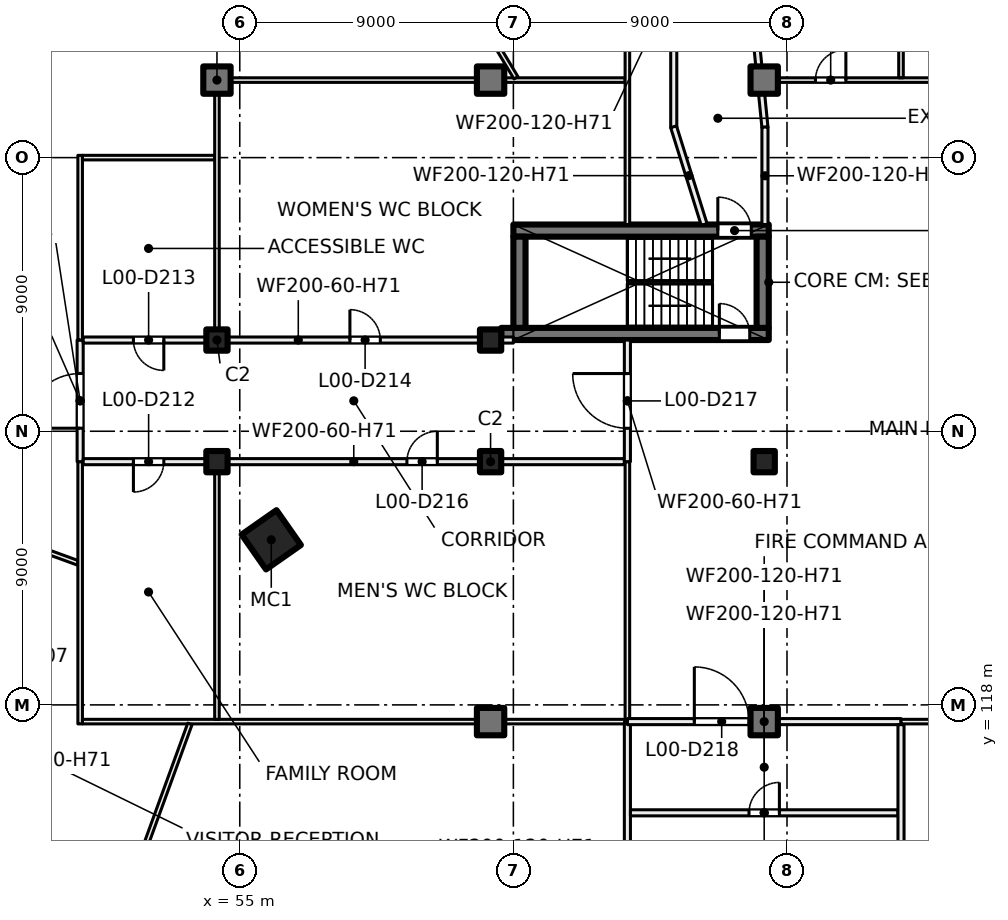
"""IFC4 building model, lengths in metres.
Left out: names, types, materials, properties, quantities, classifications, styles, units other than length and angle.
Written with IfcOpenShell. Run it as: python <this file> out.ifc"""

import sys

from ifc_helpers import new_model, si_unit, direction, frame, frame_2d, origin, origin_2d, place, context, subcontext, project, spatial, rectangle, hollow_rectangle, extrude, element, fill, save


model = new_model("IFC4")
c1 = context("Model", 3, precision=1e-05, world=origin(), true_north=direction((0.0, 1.0)))
c2 = subcontext(c1, "Body", "Model", "MODEL_VIEW")
j1 = project(units=[si_unit("LENGTHUNIT", "METRE"), si_unit("PLANEANGLEUNIT", "RADIAN")], contexts=[c1])
p1 = place(None, origin())
s1 = spatial("IfcSite", under=j1, at=p1, CompositionType="ELEMENT")
p2 = place(p1, origin())
s2 = spatial("IfcBuilding", under=s1, at=p2, CompositionType="ELEMENT")
p3 = place(p2, origin())
s3 = spatial("IfcBuildingStorey", under=s2, at=p3, CompositionType="ELEMENT", Elevation=0.0)
p4 = place(p3, frame((56.036, 123.43, 0.0), z_axis=(0.0, 0.0, 1.0), x_axis=(0.573576436351, -0.819152044289, 0.0)))
e1 = element("IfcColumn", 1, at=p4, inside=s3, PredefinedType="COLUMN", context=c2, shape_type="SweptSolid", body=[
    extrude(hollow_rectangle(XDim=1.4, YDim=1.4, WallThickness=0.04, at=origin_2d()), origin(), (0.0, 0.0, 1.0), 7.5),
])
for number, where, z_axis, x_axis in (
    (2, (54.25, 130.0, 0.0), (0.0, 0.0, 1.0), (1.0, 0.0, 0.0)),
    (3, (63.25, 130.0, 0.0), (0.0, 0.0, 1.0), (1.0, 0.0, 0.0)),
    (4, (54.25, 126.0, 0.0), (0.0, 0.0, 1.0), (1.0, 0.0, 0.0)),
    (5, (63.25, 126.0, 0.0), (0.0, 0.0, 1.0), (1.0, 0.0, 0.0)),
    (6, (72.25, 126.0, 0.0), (0.0, 0.0, 1.0), (1.0, 0.0, 0.0)),
):
    element("IfcColumn", number, at=place(p3, frame(where, z_axis=z_axis, x_axis=x_axis)), inside=s3, PredefinedType="COLUMN", context=c2, shape_type="SweptSolid", body=[
        extrude(rectangle(XDim=0.7, YDim=0.7, at=origin_2d()), origin(), (0.0, 0.0, 1.0), 7.5),
    ])
for number, where, z_axis, x_axis in (
    (7, (54.25, 138.55, 0.0), (0.0, 0.0, 1.0), (1.0, 0.0, 0.0)),
    (8, (63.25, 138.55, 0.0), (0.0, 0.0, 1.0), (1.0, 0.0, 0.0)),
    (9, (72.25, 138.55, 0.0), (0.0, 0.0, 1.0), (1.0, 0.0, 0.0)),
    (10, (63.25, 117.45, 0.0), (0.0, 0.0, 1.0), (1.0, 0.0, 0.0)),
    (11, (72.25, 117.45, 0.0), (0.0, 0.0, 1.0), (1.0, 0.0, 0.0)),
):
    element("IfcColumn", number, at=place(p3, frame(where, z_axis=z_axis, x_axis=x_axis)), inside=s3, PredefinedType="COLUMN", context=c2, shape_type="SweptSolid", body=[
        extrude(rectangle(XDim=0.9, YDim=0.9, at=origin_2d()), origin(), (0.0, 0.0, 1.0), 7.5),
    ])
p5 = place(p3, frame((63.6, 130.2, 0.0), z_axis=(0.0, 0.0, 1.0), x_axis=(1.0, 0.0, 0.0)))
e12 = element("IfcWall", 12, at=p5, inside=s3, PredefinedType="SHEAR", context=c2, shape_type="SweptSolid", body=[
    extrude(rectangle(XDim=8.8, YDim=0.4, at=frame_2d((4.4, 0.0))), origin(), (0.0, 0.0, 1.0), 7.5),
])
p6 = place(p5, frame((7.175, 0.0, 0.0)))
e13 = element("IfcOpeningElement", 13, at=p6, cuts=e12, PredefinedType="OPENING", context=c2, shape_type="SweptSolid", body=[
    extrude(rectangle(XDim=1.0, YDim=2.1, at=frame_2d((0.5, 1.05))), frame((0.0, 0.21, 0.0), z_axis=(0.0, -1.0, 0.0), x_axis=(1.0, 0.0, 0.0)), (0.0, 0.0, 1.0), 0.42),
])
p7 = place(p3, frame((64.0, 133.6, 0.0), z_axis=(0.0, 0.0, 1.0), x_axis=(1.0, 0.0, 0.0)))
e14 = element("IfcWall", 14, at=p7, inside=s3, PredefinedType="SHEAR", context=c2, shape_type="SweptSolid", body=[
    extrude(rectangle(XDim=8.4, YDim=0.4, at=frame_2d((4.2, 0.0))), origin(), (0.0, 0.0, 1.0), 7.5),
])
p8 = place(p7, frame((6.725, 0.0, 0.0)))
e15 = element("IfcOpeningElement", 15, at=p8, cuts=e14, PredefinedType="OPENING", context=c2, shape_type="SweptSolid", body=[
    extrude(rectangle(XDim=1.1, YDim=2.1, at=frame_2d((0.55, 1.05))), frame((0.0, 0.21, 0.0), z_axis=(0.0, -1.0, 0.0), x_axis=(1.0, 0.0, 0.0)), (0.0, 0.0, 1.0), 0.42),
])
for number, where, z_axis, x_axis in (
    (16, (64.2, 130.4, 0.0), (0.0, 0.0, 1.0), (0.0, 1.0, 0.0)),
    (17, (72.2, 130.4, 0.0), (0.0, 0.0, 1.0), (0.0, 1.0, 0.0)),
):
    element("IfcWall", number, at=place(p3, frame(where, z_axis=z_axis, x_axis=x_axis)), inside=s3, PredefinedType="SHEAR", context=c2, shape_type="SweptSolid", body=[
        extrude(rectangle(XDim=3.0, YDim=0.4, at=frame_2d((1.5, 0.0))), origin(), (0.0, 0.0, 1.0), 7.5),
    ])
p9 = place(p3, frame((43.613, 115.301, 0.0), z_axis=(0.0, 0.0, 1.0), x_axis=(0.93970742794, -0.341979458265, 0.0)))
e18 = element("IfcWall", 18, at=p9, inside=s3, PredefinedType="PARTITIONING", context=c2, shape_type="SweptSolid", body=[
    extrude(rectangle(XDim=8.375, YDim=0.15, at=frame_2d((4.188, 0.0))), origin(), (0.0, 0.0, 1.0), 7.1),
])
p10 = place(p3, frame((46.597, 123.792, 0.0), z_axis=(0.0, 0.0, 1.0), x_axis=(0.939619227089, -0.342221723572, 0.0)))
e19 = element("IfcWall", 19, at=p10, inside=s3, PredefinedType="PARTITIONING", context=c2, shape_type="SweptSolid", body=[
    extrude(rectangle(XDim=3.276, YDim=0.15, at=frame_2d((1.638, 0.0))), origin(), (0.0, 0.0, 1.0), 7.1),
])
p11 = place(p3, frame((49.75, 117.375, 0.0), z_axis=(0.0, 0.0, 1.0), x_axis=(0.0, 1.0, 0.0)))
e20 = element("IfcWall", 20, at=p11, inside=s3, PredefinedType="PARTITIONING", context=c2, shape_type="SweptSolid", body=[
    extrude(rectangle(XDim=8.625, YDim=0.15, at=frame_2d((4.312, 0.0))), origin(), (0.0, 0.0, 1.0), 7.1),
])
p12 = place(p3, frame((49.825, 117.45, 0.0), z_axis=(0.0, 0.0, 1.0), x_axis=(1.0, 0.0, 0.0)))
e21 = element("IfcWall", 21, at=p12, inside=s3, PredefinedType="PARTITIONING", context=c2, shape_type="SweptSolid", body=[
    extrude(rectangle(XDim=17.925, YDim=0.15, at=frame_2d((8.962, 0.0))), origin(), (0.0, 0.0, 1.0), 7.1),
])
p13 = place(p3, frame((49.75, 126.0, 0.0), z_axis=(0.0, 0.0, 1.0), x_axis=(0.0, 1.0, 0.0)))
e22 = element("IfcWall", 22, at=p13, inside=s3, PredefinedType="PARTITIONING", context=c2, shape_type="SweptSolid", body=[
    extrude(rectangle(XDim=4.0, YDim=0.2, at=frame_2d((2.0, 0.0))), origin(), (0.0, 0.0, 1.0), 7.1),
])
p14 = place(p13, frame((1.1, 0.0, 0.0)))
e23 = element("IfcOpeningElement", 23, at=p14, cuts=e22, PredefinedType="OPENING", context=c2, shape_type="SweptSolid", body=[
    extrude(rectangle(XDim=1.8, YDim=2.1, at=frame_2d((0.9, 1.05))), frame((0.0, 0.11, 0.0), z_axis=(0.0, -1.0, 0.0), x_axis=(1.0, 0.0, 0.0)), (0.0, 0.0, 1.0), 0.22),
])
p15 = place(p3, frame((67.65, 126.0, 0.0), z_axis=(0.0, 0.0, 1.0), x_axis=(-1.0, 0.0, 0.0)))
e24 = element("IfcWall", 24, at=p15, inside=s3, PredefinedType="PARTITIONING", context=c2, shape_type="SweptSolid", body=[
    extrude(rectangle(XDim=17.8, YDim=0.2, at=frame_2d((8.9, 0.0))), origin(), (0.0, 0.0, 1.0), 7.1),
])
p16 = place(p15, frame((15.148, 0.0, 0.0)))
e25 = element("IfcOpeningElement", 25, at=p16, cuts=e24, PredefinedType="OPENING", context=c2, shape_type="SweptSolid", body=[
    extrude(rectangle(XDim=1.0, YDim=2.1, at=frame_2d((0.5, 1.05))), frame((0.0, 0.11, 0.0), z_axis=(0.0, -1.0, 0.0), x_axis=(1.0, 0.0, 0.0)), (0.0, 0.0, 1.0), 0.22),
])
p17 = place(p15, frame((6.152, 0.0, 0.0)))
e26 = element("IfcOpeningElement", 26, at=p17, cuts=e24, PredefinedType="OPENING", context=c2, shape_type="SweptSolid", body=[
    extrude(rectangle(XDim=1.0, YDim=2.1, at=frame_2d((0.5, 1.05))), frame((0.0, 0.11, 0.0), z_axis=(0.0, -1.0, 0.0), x_axis=(1.0, 0.0, 0.0)), (0.0, 0.0, 1.0), 0.22),
])
p18 = place(p3, frame((49.75, 130.0, 0.0), z_axis=(0.0, 0.0, 1.0), x_axis=(0.0, 1.0, 0.0)))
e27 = element("IfcWall", 27, at=p18, inside=s3, PredefinedType="PARTITIONING", context=c2, shape_type="SweptSolid", body=[
    extrude(rectangle(XDim=6.075, YDim=0.15, at=frame_2d((3.038, 0.0))), origin(), (0.0, 0.0, 1.0), 7.1),
])
p19 = place(p3, frame((49.85, 130.0, 0.0), z_axis=(0.0, 0.0, 1.0), x_axis=(1.0, 0.0, 0.0)))
e28 = element("IfcWall", 28, at=p19, inside=s3, PredefinedType="PARTITIONING", context=c2, shape_type="SweptSolid", body=[
    extrude(rectangle(XDim=14.15, YDim=0.2, at=frame_2d((7.075, 0.0))), origin(), (0.0, 0.0, 1.0), 7.1),
])
p20 = place(p19, frame((1.652, 0.0, 0.0)))
e29 = element("IfcOpeningElement", 29, at=p20, cuts=e28, PredefinedType="OPENING", context=c2, shape_type="SweptSolid", body=[
    extrude(rectangle(XDim=1.0, YDim=2.1, at=frame_2d((0.5, 1.05))), frame((0.0, 0.11, 0.0), z_axis=(0.0, -1.0, 0.0), x_axis=(1.0, 0.0, 0.0)), (0.0, 0.0, 1.0), 0.22),
])
p21 = place(p19, frame((8.773, 0.0, 0.0)))
e30 = element("IfcOpeningElement", 30, at=p21, cuts=e28, PredefinedType="OPENING", context=c2, shape_type="SweptSolid", body=[
    extrude(rectangle(XDim=1.0, YDim=2.1, at=frame_2d((0.5, 1.05))), frame((0.0, 0.11, 0.0), z_axis=(0.0, -1.0, 0.0), x_axis=(1.0, 0.0, 0.0)), (0.0, 0.0, 1.0), 0.22),
])
p22 = place(p3, frame((49.825, 136.0, 0.0), z_axis=(0.0, 0.0, 1.0), x_axis=(1.0, 0.0, 0.0)))
e31 = element("IfcWall", 31, at=p22, inside=s3, PredefinedType="PARTITIONING", context=c2, shape_type="SweptSolid", body=[
    extrude(rectangle(XDim=4.35, YDim=0.15, at=frame_2d((2.175, 0.0))), origin(), (0.0, 0.0, 1.0), 7.1),
])
p23 = place(p3, frame((51.553, 112.411, 0.0), z_axis=(0.0, 0.0, 1.0), x_axis=(0.342076997639, 0.93967192556, 0.0)))
e32 = element("IfcWall", 32, at=p23, inside=s3, PredefinedType="PARTITIONING", context=c2, shape_type="SweptSolid", body=[
    extrude(rectangle(XDim=5.283, YDim=0.15, at=frame_2d((2.641, 0.0))), origin(), (0.0, 0.0, 1.0), 7.1),
])
p24 = place(p3, frame((54.25, 117.525, 0.0), z_axis=(0.0, 0.0, 1.0), x_axis=(0.0, 1.0, 0.0)))
e33 = element("IfcWall", 33, at=p24, inside=s3, PredefinedType="PARTITIONING", context=c2, shape_type="SweptSolid", body=[
    extrude(rectangle(XDim=8.375, YDim=0.15, at=frame_2d((4.188, 0.0))), origin(), (0.0, 0.0, 1.0), 7.1),
])
p25 = place(p3, frame((54.25, 130.1, 0.0), z_axis=(0.0, 0.0, 1.0), x_axis=(0.0, 1.0, 0.0)))
e34 = element("IfcWall", 34, at=p25, inside=s3, PredefinedType="PARTITIONING", context=c2, shape_type="SweptSolid", body=[
    extrude(rectangle(XDim=8.525, YDim=0.15, at=frame_2d((4.262, 0.0))), origin(), (0.0, 0.0, 1.0), 7.1),
])
p26 = place(p3, frame((54.325, 138.55, 0.0), z_axis=(0.0, 0.0, 1.0), x_axis=(1.0, 0.0, 0.0)))
e35 = element("IfcWall", 35, at=p26, inside=s3, PredefinedType="PARTITIONING", context=c2, shape_type="SweptSolid", body=[
    extrude(rectangle(XDim=13.35, YDim=0.15, at=frame_2d((6.675, 0.0))), origin(), (0.0, 0.0, 1.0), 7.1),
])
p27 = place(p3, frame((63.459, 139.67, 0.0), z_axis=(0.0, 0.0, 1.0), x_axis=(0.513906129706, -0.857846425563, 0.0)))
e36 = element("IfcWall", 36, at=p27, inside=s3, PredefinedType="PARTITIONING", context=c2, shape_type="SweptSolid", body=[
    extrude(rectangle(XDim=1.218, YDim=0.15, at=frame_2d((0.609, 0.0))), origin(), (0.0, 0.0, 1.0), 7.1),
])
p28 = place(p3, frame((67.75, 109.15, 0.0), z_axis=(0.0, 0.0, 1.0), x_axis=(0.0, 1.0, 0.0)))
e37 = element("IfcWall", 37, at=p28, inside=s3, PredefinedType="PARTITIONING", context=c2, shape_type="SweptSolid", body=[
    extrude(rectangle(XDim=8.28, YDim=0.2, at=frame_2d((4.14, 0.0))), origin(), (0.0, 0.0, 1.0), 7.1),
])
p29 = place(p3, frame((76.65, 114.45, 0.0), z_axis=(0.0, 0.0, 1.0), x_axis=(-1.0, 0.0, 0.0)))
e38 = element("IfcWall", 38, at=p29, inside=s3, PredefinedType="PARTITIONING", context=c2, shape_type="SweptSolid", body=[
    extrude(rectangle(XDim=8.8, YDim=0.2, at=frame_2d((4.4, 0.0))), origin(), (0.0, 0.0, 1.0), 7.1),
])
p30 = place(p29, frame((3.9, 0.0, 0.0)))
e39 = element("IfcOpeningElement", 39, at=p30, cuts=e38, PredefinedType="OPENING", context=c2, shape_type="SweptSolid", body=[
    extrude(rectangle(XDim=1.0, YDim=2.1, at=frame_2d((0.5, 1.05))), frame((0.0, 0.11, 0.0), z_axis=(0.0, -1.0, 0.0), x_axis=(1.0, 0.0, 0.0)), (0.0, 0.0, 1.0), 0.22),
])
p31 = place(p3, frame((67.75, 117.45, 0.0), z_axis=(0.0, 0.0, 1.0), x_axis=(0.0, 1.0, 0.0)))
e40 = element("IfcWall", 40, at=p31, inside=s3, PredefinedType="PARTITIONING", context=c2, shape_type="SweptSolid", body=[
    extrude(rectangle(XDim=8.55, YDim=0.15, at=frame_2d((4.275, 0.0))), origin(), (0.0, 0.0, 1.0), 7.1),
])
p32 = place(p3, frame((67.75, 117.45, 0.0), z_axis=(0.0, 0.0, 1.0), x_axis=(1.0, 0.0, 0.0)))
e41 = element("IfcWall", 41, at=p32, inside=s3, PredefinedType="PARTITIONING", context=c2, shape_type="SweptSolid", body=[
    extrude(rectangle(XDim=9.0, YDim=0.2, at=frame_2d((4.5, 0.0))), origin(), (0.0, 0.0, 1.0), 7.1),
])
p33 = place(p32, frame((2.202, 0.0, 0.0)))
e42 = element("IfcOpeningElement", 42, at=p33, cuts=e41, PredefinedType="OPENING", context=c2, shape_type="SweptSolid", body=[
    extrude(rectangle(XDim=1.8, YDim=2.1, at=frame_2d((0.9, 1.05))), frame((0.0, 0.11, 0.0), z_axis=(0.0, -1.0, 0.0), x_axis=(1.0, 0.0, 0.0)), (0.0, 0.0, 1.0), 0.22),
])
p34 = place(p3, frame((67.75, 130.0, 0.0), z_axis=(0.0, 0.0, 1.0), x_axis=(0.0, -1.0, 0.0)))
e43 = element("IfcWall", 43, at=p34, inside=s3, PredefinedType="PARTITIONING", context=c2, shape_type="SweptSolid", body=[
    extrude(rectangle(XDim=4.0, YDim=0.2, at=frame_2d((2.0, 0.0))), origin(), (0.0, 0.0, 1.0), 7.1),
])
p35 = place(p34, frame((1.102, 0.0, 0.0)))
e44 = element("IfcOpeningElement", 44, at=p35, cuts=e43, PredefinedType="OPENING", context=c2, shape_type="SweptSolid", body=[
    extrude(rectangle(XDim=1.8, YDim=2.1, at=frame_2d((0.9, 1.05))), frame((0.0, 0.11, 0.0), z_axis=(0.0, -1.0, 0.0), x_axis=(1.0, 0.0, 0.0)), (0.0, 0.0, 1.0), 0.22),
])
p36 = place(p3, frame((67.75, 133.8, 0.0), z_axis=(0.0, 0.0, 1.0), x_axis=(0.0, 1.0, 0.0)))
e45 = element("IfcWall", 45, at=p36, inside=s3, PredefinedType="PARTITIONING", context=c2, shape_type="SweptSolid", body=[
    extrude(rectangle(XDim=12.6, YDim=0.15, at=frame_2d((6.3, 0.0))), origin(), (0.0, 0.0, 1.0), 7.1),
])
p37 = place(p3, frame((69.275, 136.985, 0.0), z_axis=(0.0, 0.0, 1.0), x_axis=(0.0, 1.0, 0.0)))
e46 = element("IfcWall", 46, at=p37, inside=s3, PredefinedType="PARTITIONING", context=c2, shape_type="SweptSolid", body=[
    extrude(rectangle(XDim=9.415, YDim=0.2, at=frame_2d((4.708, 0.0))), origin(), (0.0, 0.0, 1.0), 7.1),
])
p38 = place(p3, frame((69.27, 137.015, 0.0), z_axis=(0.0, 0.0, 1.0), x_axis=(0.298341026978, -0.954459339952, 0.0)))
e47 = element("IfcWall", 47, at=p38, inside=s3, PredefinedType="PARTITIONING", context=c2, shape_type="SweptSolid", body=[
    extrude(rectangle(XDim=3.368, YDim=0.2, at=frame_2d((1.684, 0.0))), origin(), (0.0, 0.0, 1.0), 7.1),
])
p39 = place(p3, frame((71.335, 146.4, 0.0), z_axis=(0.0, 0.0, 1.0), x_axis=(0.09944745439, -0.995042815066, 0.0)))
e48 = element("IfcWall", 48, at=p39, inside=s3, PredefinedType="PARTITIONING", context=c2, shape_type="SweptSolid", body=[
    extrude(rectangle(XDim=9.452, YDim=0.2, at=frame_2d((4.726, 0.0))), origin(), (0.0, 0.0, 1.0), 7.1),
])
p40 = place(p3, frame((72.22, 138.55, 0.0), z_axis=(0.0, 0.0, 1.0), x_axis=(1.0, 0.0, 0.0)))
e49 = element("IfcWall", 49, at=p40, inside=s3, PredefinedType="PARTITIONING", context=c2, shape_type="SweptSolid", body=[
    extrude(rectangle(XDim=18.78, YDim=0.15, at=frame_2d((9.39, 0.0))), origin(), (0.0, 0.0, 1.0), 7.1),
])
p41 = place(p40, frame((1.717, 0.0, 0.0)))
e50 = element("IfcOpeningElement", 50, at=p41, cuts=e49, PredefinedType="OPENING", context=c2, shape_type="SweptSolid", body=[
    extrude(rectangle(XDim=1.0, YDim=2.1, at=frame_2d((0.5, 1.05))), frame((0.0, 0.085, 0.0), z_axis=(0.0, -1.0, 0.0), x_axis=(1.0, 0.0, 0.0)), (0.0, 0.0, 1.0), 0.17),
])
p42 = place(p40, frame((11.153, 0.0, 0.0)))
e51 = element("IfcOpeningElement", 51, at=p42, cuts=e49, PredefinedType="OPENING", context=c2, shape_type="SweptSolid", body=[
    extrude(rectangle(XDim=1.0, YDim=2.1, at=frame_2d((0.5, 1.05))), frame((0.0, 0.085, 0.0), z_axis=(0.0, -1.0, 0.0), x_axis=(1.0, 0.0, 0.0)), (0.0, 0.0, 1.0), 0.17),
])
p43 = place(p3, frame((72.275, 133.8, 0.0), z_axis=(0.0, 0.0, 1.0), x_axis=(0.0, 1.0, 0.0)))
e52 = element("IfcWall", 52, at=p43, inside=s3, PredefinedType="PARTITIONING", context=c2, shape_type="SweptSolid", body=[
    extrude(rectangle(XDim=3.205, YDim=0.2, at=frame_2d((1.603, 0.0))), origin(), (0.0, 0.0, 1.0), 7.1),
])
p44 = place(p3, frame((76.75, 109.15, 0.0), z_axis=(0.0, 0.0, 1.0), x_axis=(0.0, 1.0, 0.0)))
e53 = element("IfcWall", 53, at=p44, inside=s3, PredefinedType="PARTITIONING", context=c2, shape_type="SweptSolid", body=[
    extrude(rectangle(XDim=8.2, YDim=0.2, at=frame_2d((4.1, 0.0))), origin(), (0.0, 0.0, 1.0), 7.1),
])
p45 = place(p3, frame((76.75, 117.45, 0.0), z_axis=(0.0, 0.0, 1.0), x_axis=(1.0, 0.0, 0.0)))
e54 = element("IfcWall", 54, at=p45, inside=s3, PredefinedType="PARTITIONING", context=c2, shape_type="SweptSolid", body=[
    extrude(rectangle(XDim=14.25, YDim=0.15, at=frame_2d((7.125, 0.0))), origin(), (0.0, 0.0, 1.0), 7.1),
])
p46 = place(p45, frame((1.725, 0.0, 0.0)))
e55 = element("IfcOpeningElement", 55, at=p46, cuts=e54, PredefinedType="OPENING", context=c2, shape_type="SweptSolid", body=[
    extrude(rectangle(XDim=1.8, YDim=2.1, at=frame_2d((0.9, 1.05))), frame((0.0, 0.085, 0.0), z_axis=(0.0, -1.0, 0.0), x_axis=(1.0, 0.0, 0.0)), (0.0, 0.0, 1.0), 0.17),
])
p47 = place(p45, frame((9.248, 0.0, 0.0)))
e56 = element("IfcOpeningElement", 56, at=p47, cuts=e54, PredefinedType="OPENING", context=c2, shape_type="SweptSolid", body=[
    extrude(rectangle(XDim=1.0, YDim=2.1, at=frame_2d((0.5, 1.05))), frame((0.0, 0.085, 0.0), z_axis=(0.0, -1.0, 0.0), x_axis=(1.0, 0.0, 0.0)), (0.0, 0.0, 1.0), 0.17),
])
p48 = place(p3, frame((76.75, 138.625, 0.0), z_axis=(0.0, 0.0, 1.0), x_axis=(0.0, 1.0, 0.0)))
e57 = element("IfcWall", 57, at=p48, inside=s3, PredefinedType="PARTITIONING", context=c2, shape_type="SweptSolid", body=[
    extrude(rectangle(XDim=7.775, YDim=0.15, at=frame_2d((3.887, 0.0))), origin(), (0.0, 0.0, 1.0), 7.1),
])
p49 = place(p6, origin())
e58 = element("IfcDoor", 58, at=p49, inside=s3, OperationType="SINGLE_SWING_LEFT", PredefinedType="DOOR", context=c2, shape_type="SweptSolid", body=[
    extrude(rectangle(XDim=1.0, YDim=2.1, at=frame_2d((0.5, 1.05))), frame((0.0, 0.025, 0.0), z_axis=(0.0, -1.0, 0.0), x_axis=(1.0, 0.0, 0.0)), (0.0, 0.0, 1.0), 0.05),
])
fill(e13, e58)
p50 = place(p8, origin())
e59 = element("IfcDoor", 59, at=p50, inside=s3, OperationType="SINGLE_SWING_LEFT", PredefinedType="DOOR", context=c2, shape_type="SweptSolid", body=[
    extrude(rectangle(XDim=1.1, YDim=2.1, at=frame_2d((0.55, 1.05))), frame((0.0, 0.025, 0.0), z_axis=(0.0, -1.0, 0.0), x_axis=(1.0, 0.0, 0.0)), (0.0, 0.0, 1.0), 0.05),
])
fill(e15, e59)
p51 = place(p14, origin())
e60 = element("IfcDoor", 60, at=p51, inside=s3, OperationType="DOUBLE_DOOR_SINGLE_SWING", PredefinedType="DOOR", context=c2, shape_type="SweptSolid", body=[
    extrude(rectangle(XDim=1.8, YDim=2.1, at=frame_2d((0.9, 1.05))), frame((0.0, 0.025, 0.0), z_axis=(0.0, -1.0, 0.0), x_axis=(1.0, 0.0, 0.0)), (0.0, 0.0, 1.0), 0.05),
])
fill(e23, e60)
p52 = place(p16, origin())
e61 = element("IfcDoor", 61, at=p52, inside=s3, OperationType="SINGLE_SWING_RIGHT", PredefinedType="DOOR", context=c2, shape_type="SweptSolid", body=[
    extrude(rectangle(XDim=1.0, YDim=2.1, at=frame_2d((0.5, 1.05))), frame((0.0, 0.025, 0.0), z_axis=(0.0, -1.0, 0.0), x_axis=(1.0, 0.0, 0.0)), (0.0, 0.0, 1.0), 0.05),
])
fill(e25, e61)
p53 = place(p20, origin())
e62 = element("IfcDoor", 62, at=p53, inside=s3, OperationType="SINGLE_SWING_RIGHT", PredefinedType="DOOR", context=c2, shape_type="SweptSolid", body=[
    extrude(rectangle(XDim=1.0, YDim=2.1, at=frame_2d((0.5, 1.05))), frame((0.0, 0.025, 0.0), z_axis=(0.0, -1.0, 0.0), x_axis=(1.0, 0.0, 0.0)), (0.0, 0.0, 1.0), 0.05),
])
fill(e29, e62)
p54 = place(p21, origin())
e63 = element("IfcDoor", 63, at=p54, inside=s3, OperationType="SINGLE_SWING_LEFT", PredefinedType="DOOR", context=c2, shape_type="SweptSolid", body=[
    extrude(rectangle(XDim=1.0, YDim=2.1, at=frame_2d((0.5, 1.05))), frame((0.0, 0.025, 0.0), z_axis=(0.0, -1.0, 0.0), x_axis=(1.0, 0.0, 0.0)), (0.0, 0.0, 1.0), 0.05),
])
fill(e30, e63)
p55 = place(p17, origin())
e64 = element("IfcDoor", 64, at=p55, inside=s3, OperationType="SINGLE_SWING_LEFT", PredefinedType="DOOR", context=c2, shape_type="SweptSolid", body=[
    extrude(rectangle(XDim=1.0, YDim=2.1, at=frame_2d((0.5, 1.05))), frame((0.0, 0.025, 0.0), z_axis=(0.0, -1.0, 0.0), x_axis=(1.0, 0.0, 0.0)), (0.0, 0.0, 1.0), 0.05),
])
fill(e26, e64)
p56 = place(p35, origin())
e65 = element("IfcDoor", 65, at=p56, inside=s3, OperationType="DOUBLE_DOOR_SINGLE_SWING", PredefinedType="DOOR", context=c2, shape_type="SweptSolid", body=[
    extrude(rectangle(XDim=1.8, YDim=2.1, at=frame_2d((0.9, 1.05))), frame((0.0, 0.025, 0.0), z_axis=(0.0, -1.0, 0.0), x_axis=(1.0, 0.0, 0.0)), (0.0, 0.0, 1.0), 0.05),
])
fill(e44, e65)
p57 = place(p33, origin())
e66 = element("IfcDoor", 66, at=p57, inside=s3, OperationType="DOUBLE_DOOR_SINGLE_SWING", PredefinedType="DOOR", context=c2, shape_type="SweptSolid", body=[
    extrude(rectangle(XDim=1.8, YDim=2.1, at=frame_2d((0.9, 1.05))), frame((0.0, 0.025, 0.0), z_axis=(0.0, -1.0, 0.0), x_axis=(1.0, 0.0, 0.0)), (0.0, 0.0, 1.0), 0.05),
])
fill(e42, e66)
p58 = place(p30, origin())
e67 = element("IfcDoor", 67, at=p58, inside=s3, OperationType="SINGLE_SWING_LEFT", PredefinedType="DOOR", context=c2, shape_type="SweptSolid", body=[
    extrude(rectangle(XDim=1.0, YDim=2.1, at=frame_2d((0.5, 1.05))), frame((0.0, 0.025, 0.0), z_axis=(0.0, -1.0, 0.0), x_axis=(1.0, 0.0, 0.0)), (0.0, 0.0, 1.0), 0.05),
])
fill(e39, e67)
p59 = place(p41, origin())
e68 = element("IfcDoor", 68, at=p59, inside=s3, OperationType="SINGLE_SWING_RIGHT", PredefinedType="DOOR", context=c2, shape_type="SweptSolid", body=[
    extrude(rectangle(XDim=1.0, YDim=2.1, at=frame_2d((0.5, 1.05))), frame((0.0, 0.025, 0.0), z_axis=(0.0, -1.0, 0.0), x_axis=(1.0, 0.0, 0.0)), (0.0, 0.0, 1.0), 0.05),
])
fill(e50, e68)
save(model, sys.argv[1])
